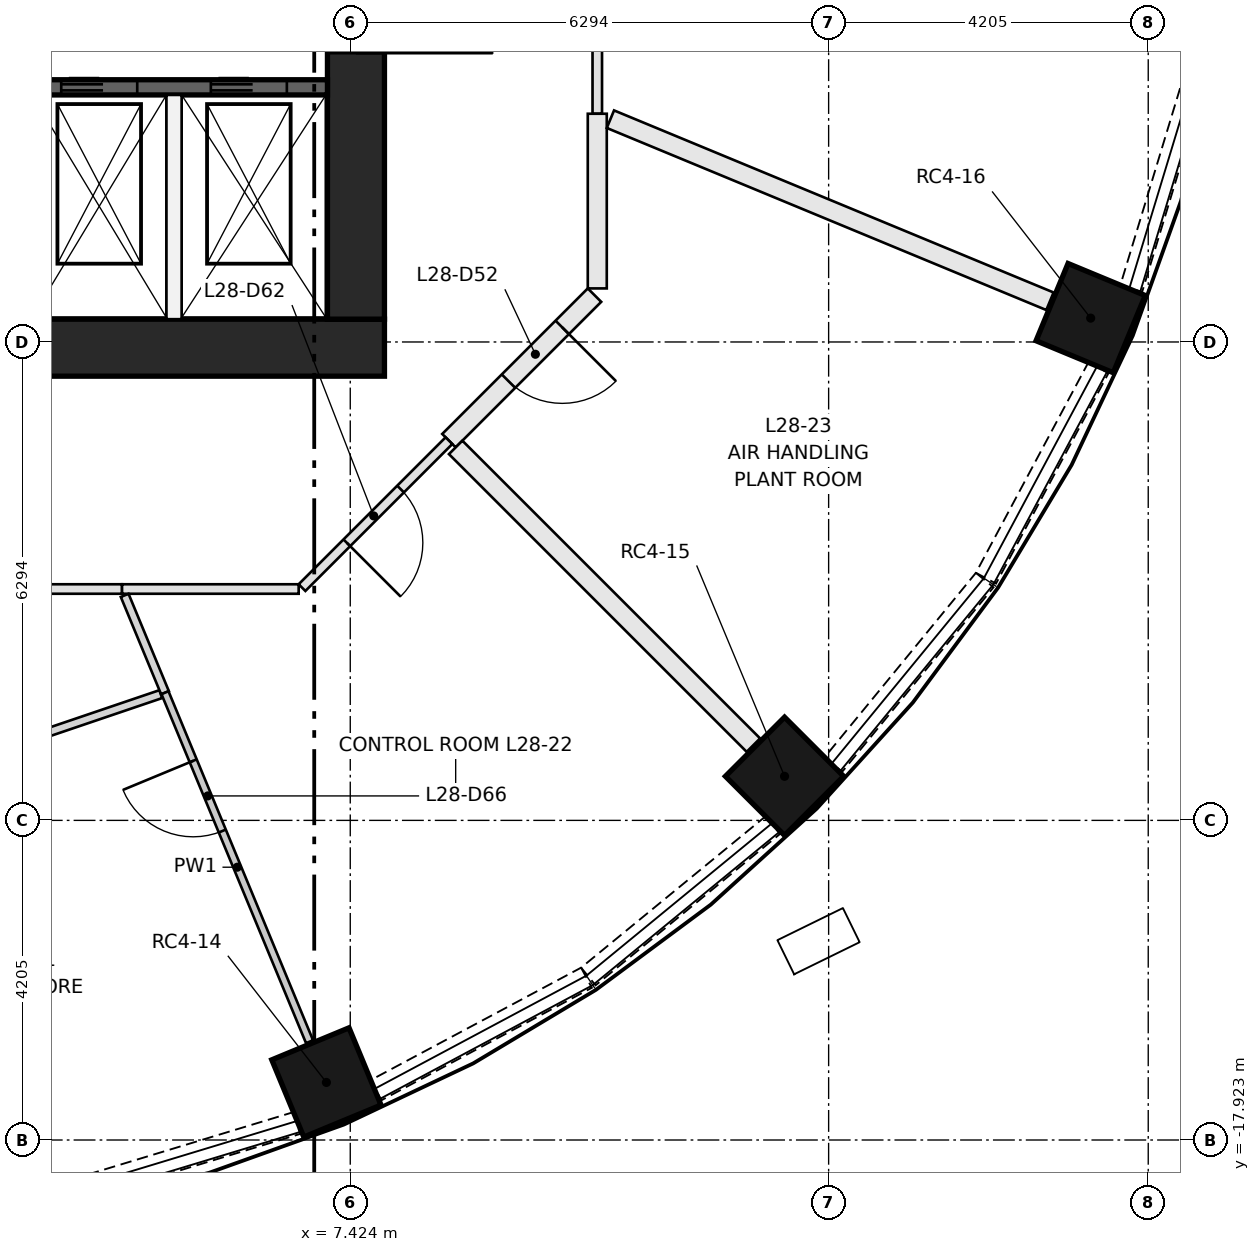
"""IFC4 building model, lengths in metres.
Left out: names, types, materials, properties, quantities, classifications, styles, units other than length and angle.
Written with IfcOpenShell. Run it as: python <this file> out.ifc"""

import sys

from ifc_helpers import new_model, si_unit, direction, frame, frame_2d, origin, origin_2d, place, context, subcontext, project, spatial, rectangle, extrude, element, fill, save


model = new_model("IFC4")
c1 = context("Model", 3, precision=1e-05, world=origin(), true_north=direction((0.0, 1.0)))
c2 = subcontext(c1, "Body", "Model", "MODEL_VIEW")
j1 = project(units=[si_unit("LENGTHUNIT", "METRE"), si_unit("PLANEANGLEUNIT", "RADIAN")], contexts=[c1])
p1 = place(None, origin())
s1 = spatial("IfcSite", under=j1, at=p1, CompositionType="ELEMENT")
p2 = place(p1, origin())
s2 = spatial("IfcBuilding", under=s1, at=p2, CompositionType="ELEMENT")
p3 = place(p2, frame((0.0, 0.0, 109.25)))
s3 = spatial("IfcBuildingStorey", under=s2, at=p3, CompositionType="ELEMENT", Elevation=109.25)
for number, where, z_axis, x_axis in (
    (1, (7.11, -17.166, 0.0), (0.0, 0.0, 1.0), (0.383, -0.924, 0.0)),
    (2, (13.138, -13.138, 0.0), (0.0, 0.0, 1.0), (0.707, -0.707, 0.0)),
    (3, (17.166, -7.11, 0.0), (0.0, 0.0, 1.0), (0.924, -0.383, 0.0)),
):
    element("IfcColumn", number, at=place(p3, frame(where, z_axis=z_axis, x_axis=x_axis)), inside=s3, PredefinedType="COLUMN", context=c2, shape_type="SweptSolid", body=[
        extrude(rectangle(XDim=1.1, YDim=1.1, at=origin_2d()), origin(), (0.0, 0.0, 1.0), 3.65),
    ])
p4 = place(p3, frame((-7.874, -7.499, 0.0), z_axis=(0.0, 0.0, 1.0), x_axis=(1.0, 0.0, 0.0)))
e4 = element("IfcWall", 4, at=p4, inside=s3, PredefinedType="SHEAR", context=c2, shape_type="SweptSolid", body=[
    extrude(rectangle(XDim=15.748, YDim=0.75, at=frame_2d((7.874, 0.0))), origin(), (0.0, 0.0, 1.0), 3.65),
])
p5 = place(p3, frame((7.499, -7.124, 0.0), z_axis=(0.0, 0.0, 1.0), x_axis=(0.0, 1.0, 0.0)))
e5 = element("IfcWall", 5, at=p5, inside=s3, PredefinedType="SHEAR", context=c2, shape_type="SweptSolid", body=[
    extrude(rectangle(XDim=14.248, YDim=0.75, at=frame_2d((7.124, 0.0))), origin(), (0.0, 0.0, 1.0), 3.65),
])
p6 = place(p5, frame((6.624, 0.0, 0.0)))
e6 = element("IfcOpeningElement", 6, at=p6, cuts=e5, PredefinedType="OPENING", context=c2, shape_type="SweptSolid", body=[
    extrude(rectangle(XDim=1.0, YDim=2.1, at=frame_2d((0.5, 1.05))), frame((0.0, 0.385, 0.0), z_axis=(0.0, -1.0, 0.0), x_axis=(1.0, 0.0, 0.0)), (0.0, 0.0, 1.0), 0.77),
])
p7 = place(p5, frame((3.5, 0.0, 0.0)))
e7 = element("IfcOpeningElement", 7, at=p7, cuts=e5, PredefinedType="OPENING", context=c2, shape_type="SweptSolid", body=[
    extrude(rectangle(XDim=1.8, YDim=2.1, at=frame_2d((0.9, 1.05))), frame((0.0, 0.385, 0.0), z_axis=(0.0, -1.0, 0.0), x_axis=(1.0, 0.0, 0.0)), (0.0, 0.0, 1.0), 0.77),
])
p8 = place(p5, frame((8.948, 0.0, 0.0)))
e8 = element("IfcOpeningElement", 8, at=p8, cuts=e5, PredefinedType="OPENING", context=c2, shape_type="SweptSolid", body=[
    extrude(rectangle(XDim=1.8, YDim=2.1, at=frame_2d((0.9, 1.05))), frame((0.0, 0.385, 0.0), z_axis=(0.0, -1.0, 0.0), x_axis=(1.0, 0.0, 0.0)), (0.0, 0.0, 1.0), 0.77),
])
p9 = place(p3, frame((-7.124, -4.074, 0.0), z_axis=(0.0, 0.0, 1.0), x_axis=(1.0, 0.0, 0.0)))
e9 = element("IfcWall", 9, at=p9, inside=s3, PredefinedType="SHEAR", context=c2, shape_type="SweptSolid", body=[
    extrude(rectangle(XDim=14.248, YDim=0.2, at=frame_2d((7.124, 0.0))), origin(), (0.0, 0.0, 1.0), 3.3),
])
p10 = place(p9, frame((1.069, 0.0, 0.0)))
e10 = element("IfcOpeningElement", 10, at=p10, cuts=e9, PredefinedType="OPENING", context=c2, shape_type="SweptSolid", body=[
    extrude(rectangle(XDim=1.1, YDim=2.1, at=frame_2d((0.55, 1.05))), frame((0.0, 0.11, 0.0), z_axis=(0.0, -1.0, 0.0), x_axis=(1.0, 0.0, 0.0)), (0.0, 0.0, 1.0), 0.22),
])
p11 = place(p9, frame((4.206, 0.0, 0.0)))
e11 = element("IfcOpeningElement", 11, at=p11, cuts=e9, PredefinedType="OPENING", context=c2, shape_type="SweptSolid", body=[
    extrude(rectangle(XDim=1.1, YDim=2.1, at=frame_2d((0.55, 1.05))), frame((0.0, 0.11, 0.0), z_axis=(0.0, -1.0, 0.0), x_axis=(1.0, 0.0, 0.0)), (0.0, 0.0, 1.0), 0.22),
])
p12 = place(p9, frame((6.808, 0.0, 0.0)))
e12 = element("IfcOpeningElement", 12, at=p12, cuts=e9, PredefinedType="OPENING", context=c2, shape_type="SweptSolid", body=[
    extrude(rectangle(XDim=1.0, YDim=2.1, at=frame_2d((0.5, 1.05))), frame((0.0, 0.11, 0.0), z_axis=(0.0, -1.0, 0.0), x_axis=(1.0, 0.0, 0.0)), (0.0, 0.0, 1.0), 0.22),
])
p13 = place(p9, frame((8.777, 0.0, 0.0)))
e13 = element("IfcOpeningElement", 13, at=p13, cuts=e9, PredefinedType="OPENING", context=c2, shape_type="SweptSolid", body=[
    extrude(rectangle(XDim=1.0, YDim=2.1, at=frame_2d((0.5, 1.05))), frame((0.0, 0.11, 0.0), z_axis=(0.0, -1.0, 0.0), x_axis=(1.0, 0.0, 0.0)), (0.0, 0.0, 1.0), 0.22),
])
p14 = place(p9, frame((10.745, 0.0, 0.0)))
e14 = element("IfcOpeningElement", 14, at=p14, cuts=e9, PredefinedType="OPENING", context=c2, shape_type="SweptSolid", body=[
    extrude(rectangle(XDim=1.0, YDim=2.1, at=frame_2d((0.5, 1.05))), frame((0.0, 0.11, 0.0), z_axis=(0.0, -1.0, 0.0), x_axis=(1.0, 0.0, 0.0)), (0.0, 0.0, 1.0), 0.22),
])
p15 = place(p9, frame((12.714, 0.0, 0.0)))
e15 = element("IfcOpeningElement", 15, at=p15, cuts=e9, PredefinedType="OPENING", context=c2, shape_type="SweptSolid", body=[
    extrude(rectangle(XDim=1.0, YDim=2.1, at=frame_2d((0.5, 1.05))), frame((0.0, 0.11, 0.0), z_axis=(0.0, -1.0, 0.0), x_axis=(1.0, 0.0, 0.0)), (0.0, 0.0, 1.0), 0.22),
])
p16 = place(p3, frame((5.105, -7.124, 0.0), z_axis=(0.0, 0.0, 1.0), x_axis=(0.0, 1.0, 0.0)))
e16 = element("IfcWall", 16, at=p16, inside=s3, PredefinedType="PARTITIONING", context=c2, shape_type="SweptSolid", body=[
    extrude(rectangle(XDim=2.95, YDim=0.2, at=frame_2d((1.475, 0.0))), origin(), (0.0, 0.0, 1.0), 3.3),
])
p17 = place(p3, frame((3.717, -18.611, 0.0), z_axis=(0.0, 0.0, 1.0), x_axis=(0.956961595403, 0.290214584271, 0.0)))
e17 = element("IfcWall", 17, at=p17, inside=s3, PredefinedType="SOLIDWALL", context=c2, shape_type="SweptSolid", body=[
    extrude(rectangle(XDim=3.139, YDim=0.3, at=frame_2d((1.57, 0.0))), origin(), (0.0, 0.0, 1.0), 0.9),
])
p18 = place(p3, frame((7.763, -17.268, 0.0), z_axis=(0.0, 0.0, 1.0), x_axis=(0.88193278355, 0.471375185282, 0.0)))
e18 = element("IfcWall", 18, at=p18, inside=s3, PredefinedType="SOLIDWALL", context=c2, shape_type="SweptSolid", body=[
    extrude(rectangle(XDim=3.139, YDim=0.3, at=frame_2d((1.57, 0.0))), origin(), (0.0, 0.0, 1.0), 0.9),
])
for number, where, z_axis, x_axis in (
    (19, (10.557, -15.771, 0.0), (0.0, 0.0, 1.0), (0.773, 0.634, 0.0)),
    (20, (13.781, -12.983, 0.0), (0.0, 0.0, 1.0), (0.634, 0.773, 0.0)),
):
    element("IfcWall", number, at=place(p3, frame(where, z_axis=z_axis, x_axis=x_axis)), inside=s3, PredefinedType="SOLIDWALL", context=c2, shape_type="SweptSolid", body=[
        extrude(rectangle(XDim=3.139, YDim=0.3, at=frame_2d((1.569, 0.0))), origin(), (0.0, 0.0, 1.0), 0.9),
    ])
p19 = place(p3, frame((15.788, -10.532, 0.0), z_axis=(0.0, 0.0, 1.0), x_axis=(0.471375185282, 0.88193278355, 0.0)))
e21 = element("IfcWall", 21, at=p19, inside=s3, PredefinedType="SOLIDWALL", context=c2, shape_type="SweptSolid", body=[
    extrude(rectangle(XDim=3.139, YDim=0.3, at=frame_2d((1.57, 0.0))), origin(), (0.0, 0.0, 1.0), 0.9),
])
p20 = place(p3, frame((17.699, -6.722, 0.0), z_axis=(0.0, 0.0, 1.0), x_axis=(0.290214584271, 0.956961595403, 0.0)))
e22 = element("IfcWall", 22, at=p20, inside=s3, PredefinedType="SOLIDWALL", context=c2, shape_type="SweptSolid", body=[
    extrude(rectangle(XDim=3.139, YDim=0.3, at=frame_2d((1.57, 0.0))), origin(), (0.0, 0.0, 1.0), 0.9),
])
p21 = place(p3, frame((10.674, 4.421, 0.0), z_axis=(0.0, 0.0, 1.0), x_axis=(0.0, -1.0, 0.0)))
e23 = element("IfcWall", 23, at=p21, inside=s3, PredefinedType="PARTITIONING", context=c2, shape_type="SweptSolid", body=[
    extrude(rectangle(XDim=8.843, YDim=0.125, at=frame_2d((4.421, 0.0))), origin(), (0.0, 0.0, 1.0), 3.3),
])
p22 = place(p21, frame((3.5, 0.0, 0.0)))
e24 = element("IfcOpeningElement", 24, at=p22, cuts=e23, PredefinedType="OPENING", context=c2, shape_type="SweptSolid", body=[
    extrude(rectangle(XDim=1.8, YDim=2.1, at=frame_2d((0.9, 1.05))), frame((0.0, 0.073, 0.0), z_axis=(0.0, -1.0, 0.0), x_axis=(1.0, 0.0, 0.0)), (0.0, 0.0, 1.0), 0.145),
])
p23 = place(p3, frame((10.637, -6.808, 0.0), z_axis=(0.0, 0.0, 1.0), x_axis=(-0.707151855722, -0.707061703777, 0.0)))
e25 = element("IfcWall", 25, at=p23, inside=s3, PredefinedType="PARTITIONING", context=c2, shape_type="SweptSolid", body=[
    extrude(rectangle(XDim=2.708, YDim=0.25, at=frame_2d((1.354, 0.0))), origin(), (0.0, 0.0, 1.0), 3.3),
])
p24 = place(p23, frame((0.6, 0.0, 0.0)))
e26 = element("IfcOpeningElement", 26, at=p24, cuts=e25, PredefinedType="OPENING", context=c2, shape_type="SweptSolid", body=[
    extrude(rectangle(XDim=1.0, YDim=2.1, at=frame_2d((0.5, 1.05))), frame((0.0, 0.135, 0.0), z_axis=(0.0, -1.0, 0.0), x_axis=(1.0, 0.0, 0.0)), (0.0, 0.0, 1.0), 0.27),
])
p25 = place(p3, frame((10.674, -4.421, 0.0), z_axis=(0.0, 0.0, 1.0), x_axis=(0.0, -1.0, 0.0)))
e27 = element("IfcWall", 27, at=p25, inside=s3, PredefinedType="PARTITIONING", context=c2, shape_type="SweptSolid", body=[
    extrude(rectangle(XDim=2.298, YDim=0.25, at=frame_2d((1.149, 0.0))), origin(), (0.0, 0.0, 1.0), 3.3),
])
p26 = place(p3, frame((4.421, -10.674, 0.0), z_axis=(0.0, 0.0, 1.0), x_axis=(-1.0, 0.0, 0.0)))
e28 = element("IfcWall", 28, at=p26, inside=s3, PredefinedType="PARTITIONING", context=c2, shape_type="SweptSolid", body=[
    extrude(rectangle(XDim=4.359, YDim=0.125, at=frame_2d((2.179, 0.0))), origin(), (0.0, 0.0, 1.0), 3.3),
])
p27 = place(p26, frame((1.7, 0.0, 0.0)))
e29 = element("IfcOpeningElement", 29, at=p27, cuts=e28, PredefinedType="OPENING", context=c2, shape_type="SweptSolid", body=[
    extrude(rectangle(XDim=1.0, YDim=2.1, at=frame_2d((0.5, 1.05))), frame((0.0, 0.073, 0.0), z_axis=(0.0, -1.0, 0.0), x_axis=(1.0, 0.0, 0.0)), (0.0, 0.0, 1.0), 0.145),
])
p28 = place(p3, frame((6.745, -10.674, 0.0), z_axis=(0.0, 0.0, 1.0), x_axis=(-1.0, 0.0, 0.0)))
e30 = element("IfcWall", 30, at=p28, inside=s3, PredefinedType="PARTITIONING", context=c2, shape_type="SweptSolid", body=[
    extrude(rectangle(XDim=2.324, YDim=0.125, at=frame_2d((1.162, 0.0))), origin(), (0.0, 0.0, 1.0), 3.3),
])
p29 = place(p3, frame((8.722, -8.722, 0.0), z_axis=(0.0, 0.0, 1.0), x_axis=(-0.707062130741, -0.707151428813, 0.0)))
e31 = element("IfcWall", 31, at=p29, inside=s3, PredefinedType="PARTITIONING", context=c2, shape_type="SweptSolid", body=[
    extrude(rectangle(XDim=2.734, YDim=0.125, at=frame_2d((1.367, 0.0))), origin(), (0.0, 0.0, 1.0), 3.3),
])
p30 = place(p29, frame((0.9, 0.0, 0.0)))
e32 = element("IfcOpeningElement", 32, at=p30, cuts=e31, PredefinedType="OPENING", context=c2, shape_type="SweptSolid", body=[
    extrude(rectangle(XDim=1.0, YDim=2.1, at=frame_2d((0.5, 1.05))), frame((0.0, 0.073, 0.0), z_axis=(0.0, -1.0, 0.0), x_axis=(1.0, 0.0, 0.0)), (0.0, 0.0, 1.0), 0.145),
])
p31 = place(p3, frame((16.63, -6.888, 0.0), z_axis=(0.0, 0.0, 1.0), x_axis=(-0.923891816603, 0.382653774599, 0.0)))
e33 = element("IfcWall", 33, at=p31, inside=s3, PredefinedType="PARTITIONING", context=c2, shape_type="SweptSolid", body=[
    extrude(rectangle(XDim=6.26, YDim=0.25, at=frame_2d((3.13, 0.0))), origin(), (0.0, 0.0, 1.0), 3.3),
])
p32 = place(p3, frame((4.931, -12.057, 0.0), z_axis=(0.0, 0.0, 1.0), x_axis=(-0.946990007889, -0.321263015235, 0.0)))
e34 = element("IfcWall", 34, at=p32, inside=s3, PredefinedType="PARTITIONING", context=c2, shape_type="SweptSolid", body=[
    extrude(rectangle(XDim=1.642, YDim=0.11, at=frame_2d((0.821, 0.0))), origin(), (0.0, 0.0, 1.0), 3.3),
])
p33 = place(p3, frame((4.456, -10.758, 0.0), z_axis=(0.0, 0.0, 1.0), x_axis=(0.382751066095, -0.923851514803, 0.0)))
e35 = element("IfcWall", 35, at=p33, inside=s3, PredefinedType="PARTITIONING", context=c2, shape_type="SweptSolid", body=[
    extrude(rectangle(XDim=1.386, YDim=0.11, at=frame_2d((0.693, 0.0))), origin(), (0.0, 0.0, 1.0), 3.3),
])
p34 = place(p3, frame((6.888, -16.63, 0.0), z_axis=(0.0, 0.0, 1.0), x_axis=(-0.38266126553, 0.923888714003, 0.0)))
e36 = element("IfcWall", 36, at=p34, inside=s3, PredefinedType="PARTITIONING", context=c2, shape_type="SweptSolid", body=[
    extrude(rectangle(XDim=4.97, YDim=0.1, at=frame_2d((2.485, 0.0))), origin(), (0.0, 0.0, 1.0), 3.3),
])
p35 = place(p34, frame((3.0, 0.0, 0.0)))
e37 = element("IfcOpeningElement", 37, at=p35, cuts=e36, PredefinedType="OPENING", context=c2, shape_type="SweptSolid", body=[
    extrude(rectangle(XDim=1.0, YDim=2.1, at=frame_2d((0.5, 1.05))), frame((0.0, 0.06, 0.0), z_axis=(0.0, -1.0, 0.0), x_axis=(1.0, 0.0, 0.0)), (0.0, 0.0, 1.0), 0.12),
])
p36 = place(p3, frame((8.811, -8.811, 0.0), z_axis=(0.0, 0.0, 1.0), x_axis=(0.707106781187, -0.707106781187, 0.0)))
e38 = element("IfcWall", 38, at=p36, inside=s3, PredefinedType="PARTITIONING", context=c2, shape_type="SweptSolid", body=[
    extrude(rectangle(XDim=5.54, YDim=0.25, at=frame_2d((2.77, 0.0))), origin(), (0.0, 0.0, 1.0), 3.3),
])
p37 = place(p14, origin())
e39 = element("IfcDoor", 39, at=p37, inside=s3, OperationType="DOUBLE_DOOR_SLIDING", PredefinedType="DOOR", context=c2, shape_type="SweptSolid", body=[
    extrude(rectangle(XDim=1.0, YDim=2.1, at=frame_2d((0.5, 1.05))), frame((0.0, 0.025, 0.0), z_axis=(0.0, -1.0, 0.0), x_axis=(1.0, 0.0, 0.0)), (0.0, 0.0, 1.0), 0.05),
])
fill(e14, e39)
p38 = place(p15, origin())
e40 = element("IfcDoor", 40, at=p38, inside=s3, OperationType="DOUBLE_DOOR_SLIDING", PredefinedType="DOOR", context=c2, shape_type="SweptSolid", body=[
    extrude(rectangle(XDim=1.0, YDim=2.1, at=frame_2d((0.5, 1.05))), frame((0.0, 0.025, 0.0), z_axis=(0.0, -1.0, 0.0), x_axis=(1.0, 0.0, 0.0)), (0.0, 0.0, 1.0), 0.05),
])
fill(e15, e40)
p39 = place(p7, frame((1.8, 0.0, 0.0), z_axis=(0.0, 0.0, 1.0), x_axis=(-1.0, 0.0, 0.0)))
e41 = element("IfcDoor", 41, at=p39, inside=s3, OperationType="DOUBLE_DOOR_SINGLE_SWING", PredefinedType="DOOR", context=c2, shape_type="SweptSolid", body=[
    extrude(rectangle(XDim=1.8, YDim=2.1, at=frame_2d((0.9, 1.05))), frame((0.0, 0.025, 0.0), z_axis=(0.0, -1.0, 0.0), x_axis=(1.0, 0.0, 0.0)), (0.0, 0.0, 1.0), 0.05),
])
fill(e7, e41)
p40 = place(p24, origin())
e42 = element("IfcDoor", 42, at=p40, inside=s3, OperationType="SINGLE_SWING_LEFT", PredefinedType="DOOR", context=c2, shape_type="SweptSolid", body=[
    extrude(rectangle(XDim=1.0, YDim=2.1, at=frame_2d((0.5, 1.05))), frame((0.0, 0.025, 0.0), z_axis=(0.0, -1.0, 0.0), x_axis=(1.0, 0.0, 0.0)), (0.0, 0.0, 1.0), 0.05),
])
fill(e26, e42)
p41 = place(p30, origin())
e43 = element("IfcDoor", 43, at=p41, inside=s3, OperationType="SINGLE_SWING_RIGHT", PredefinedType="DOOR", context=c2, shape_type="SweptSolid", body=[
    extrude(rectangle(XDim=1.0, YDim=2.1, at=frame_2d((0.5, 1.05))), frame((0.0, 0.025, 0.0), z_axis=(0.0, -1.0, 0.0), x_axis=(1.0, 0.0, 0.0)), (0.0, 0.0, 1.0), 0.05),
])
fill(e32, e43)
p42 = place(p35, origin())
e44 = element("IfcDoor", 44, at=p42, inside=s3, OperationType="SINGLE_SWING_RIGHT", PredefinedType="DOOR", context=c2, shape_type="SweptSolid", body=[
    extrude(rectangle(XDim=1.0, YDim=2.1, at=frame_2d((0.5, 1.05))), frame((0.0, 0.025, 0.0), z_axis=(0.0, -1.0, 0.0), x_axis=(1.0, 0.0, 0.0)), (0.0, 0.0, 1.0), 0.05),
])
fill(e37, e44)
save(model, sys.argv[1])
